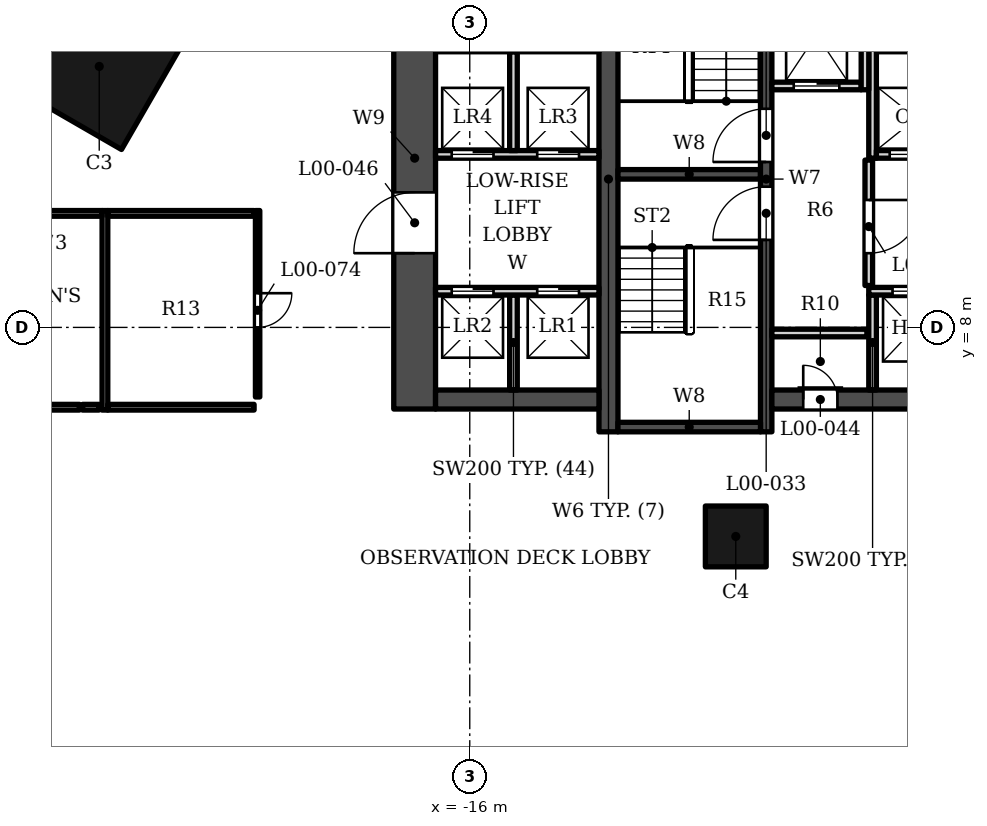
"""IFC4 building model, lengths in metres.
Left out: names, types, materials, properties, quantities, classifications, styles, units other than length and angle.
Written with IfcOpenShell. Run it as: python <this file> out.ifc"""

import sys

from ifc_helpers import new_model, si_unit, direction, frame, frame_2d, origin, origin_2d, place, context, subcontext, project, spatial, rectangle, extrude, element, fill, save


model = new_model("IFC4")
c1 = context("Model", 3, precision=1e-05, world=origin(), true_north=direction((0.0, 1.0)))
c2 = subcontext(c1, "Body", "Model", "MODEL_VIEW")
j1 = project(units=[si_unit("LENGTHUNIT", "METRE"), si_unit("PLANEANGLEUNIT", "RADIAN")], contexts=[c1])
p1 = place(None, origin())
s1 = spatial("IfcSite", under=j1, at=p1, CompositionType="ELEMENT")
p2 = place(p1, origin())
s2 = spatial("IfcBuilding", under=s1, at=p2, CompositionType="ELEMENT")
p3 = place(p2, origin())
s3 = spatial("IfcBuildingStorey", under=s2, at=p3, CompositionType="ELEMENT", Elevation=0.0)
p4 = place(p3, frame((-25.75, 14.867, 0.0), z_axis=(0.0, 0.0, 1.0), x_axis=(0.866025386331, -0.50000003023, 0.0)))
e1 = element("IfcColumn", 1, at=p4, inside=s3, PredefinedType="COLUMN", context=c2, shape_type="SweptSolid", body=[
    extrude(rectangle(XDim=3.2, YDim=3.2, at=origin_2d()), origin(), (0.0, 0.0, 1.0), 9.0),
])
p5 = place(p3, frame((-9.0, 2.5, 0.0), z_axis=(0.0, 0.0, 1.0), x_axis=(1.0, 0.0, 0.0)))
e2 = element("IfcColumn", 2, at=p5, inside=s3, PredefinedType="COLUMN", context=c2, shape_type="SweptSolid", body=[
    extrude(rectangle(XDim=1.6, YDim=1.6, at=origin_2d()), origin(), (0.0, 0.0, 1.0), 9.0),
])
p6 = place(p3, frame((-12.35, 5.253, 0.0), z_axis=(0.0, 0.0, 1.0), x_axis=(0.0, 1.0, 0.0)))
e3 = element("IfcWall", 3, at=p6, inside=s3, PredefinedType="SHEAR", context=c2, shape_type="SweptSolid", body=[
    extrude(rectangle(XDim=13.3, YDim=0.5, at=frame_2d((6.65, 0.0))), origin(), (0.0, 0.0, 1.0), 9.0),
])
p7 = place(p3, frame((-8.2, 5.253, 0.0), z_axis=(0.0, 0.0, 1.0), x_axis=(0.0, 1.0, 0.0)))
e4 = element("IfcWall", 4, at=p7, inside=s3, PredefinedType="SHEAR", context=c2, shape_type="SweptSolid", body=[
    extrude(rectangle(XDim=13.3, YDim=0.3, at=frame_2d((6.65, 0.0))), origin(), (0.0, 0.0, 1.0), 9.0),
])
p8 = place(p7, frame((7.1, 0.0, 0.0)))
e5 = element("IfcOpeningElement", 5, at=p8, cuts=e4, PredefinedType="OPENING", context=c2, shape_type="SweptSolid", body=[
    extrude(rectangle(XDim=1.4, YDim=2.1, at=frame_2d((0.7, 1.05))), frame((0.0, 0.16, 0.0), z_axis=(0.0, -1.0, 0.0), x_axis=(1.0, 0.0, 0.0)), (0.0, 0.0, 1.0), 0.32),
])
p9 = place(p7, frame((5.05, 0.0, 0.0)))
e6 = element("IfcOpeningElement", 6, at=p9, cuts=e4, PredefinedType="OPENING", context=c2, shape_type="SweptSolid", body=[
    extrude(rectangle(XDim=1.4, YDim=2.1, at=frame_2d((0.7, 1.05))), frame((0.0, 0.16, 0.0), z_axis=(0.0, -1.0, 0.0), x_axis=(1.0, 0.0, 0.0)), (0.0, 0.0, 1.0), 0.32),
])
for number, where, z_axis, x_axis in (
    (7, (-12.1, 12.028, 0.0), (0.0, 0.0, 1.0), (1.0, 0.0, 0.0)),
    (8, (-12.1, 5.378, 0.0), (0.0, 0.0, 1.0), (1.0, 0.0, 0.0)),
):
    element("IfcWall", number, at=place(p3, frame(where, z_axis=z_axis, x_axis=x_axis)), inside=s3, PredefinedType="SHEAR", context=c2, shape_type="SweptSolid", body=[
        extrude(rectangle(XDim=3.75, YDim=0.25, at=frame_2d((1.875, 0.0))), origin(), (0.0, 0.0, 1.0), 9.0),
    ])
p10 = place(p3, frame((-8.05, 6.103, 0.0), z_axis=(0.0, 0.0, 1.0), x_axis=(1.0, 0.0, 0.0)))
e9 = element("IfcWall", 9, at=p10, inside=s3, PredefinedType="SHEAR", context=c2, shape_type="SweptSolid", body=[
    extrude(rectangle(XDim=7.05, YDim=0.5, at=frame_2d((3.525, 0.0))), origin(), (0.0, 0.0, 1.0), 9.0),
])
p11 = place(p10, frame((0.825, 0.0, 0.0)))
e10 = element("IfcOpeningElement", 10, at=p11, cuts=e9, PredefinedType="OPENING", context=c2, shape_type="SweptSolid", body=[
    extrude(rectangle(XDim=0.9, YDim=2.1, at=frame_2d((0.45, 1.05))), frame((0.0, 0.26, 0.0), z_axis=(0.0, -1.0, 0.0), x_axis=(1.0, 0.0, 0.0)), (0.0, 0.0, 1.0), 0.52),
])
p12 = place(p3, frame((-12.6, 6.103, 0.0), z_axis=(0.0, 0.0, 1.0), x_axis=(-1.0, 0.0, 0.0)))
e11 = element("IfcWall", 11, at=p12, inside=s3, PredefinedType="SHEAR", context=c2, shape_type="SweptSolid", body=[
    extrude(rectangle(XDim=4.3, YDim=0.5, at=frame_2d((2.15, 0.0))), origin(), (0.0, 0.0, 1.0), 9.0),
])
p13 = place(p3, frame((-17.45, 5.853, 0.0), z_axis=(0.0, 0.0, 1.0), x_axis=(0.0, 1.0, 0.0)))
e12 = element("IfcWall", 12, at=p13, inside=s3, PredefinedType="SHEAR", context=c2, shape_type="SweptSolid", body=[
    extrude(rectangle(XDim=13.2, YDim=1.1, at=frame_2d((6.6, 0.0))), origin(), (0.0, 0.0, 1.0), 9.0),
])
p14 = place(p13, frame((4.1, 0.0, 0.0)))
e13 = element("IfcOpeningElement", 13, at=p14, cuts=e12, PredefinedType="OPENING", context=c2, shape_type="SweptSolid", body=[
    extrude(rectangle(XDim=1.6, YDim=2.1, at=frame_2d((0.8, 1.05))), frame((0.0, 0.56, 0.0), z_axis=(0.0, -1.0, 0.0), x_axis=(1.0, 0.0, 0.0)), (0.0, 0.0, 1.0), 1.12),
])
p15 = place(p13, frame((9.75, 0.0, 0.0)))
e14 = element("IfcOpeningElement", 14, at=p15, cuts=e12, PredefinedType="OPENING", context=c2, shape_type="SweptSolid", body=[
    extrude(rectangle(XDim=0.9, YDim=2.1, at=frame_2d((0.45, 1.05))), frame((0.0, 0.56, 0.0), z_axis=(0.0, -1.0, 0.0), x_axis=(1.0, 0.0, 0.0)), (0.0, 0.0, 1.0), 1.12),
])
for number, where, z_axis, x_axis in (
    (15, (-14.85, 6.353, 0.0), (0.0, 0.0, 1.0), (0.0, 1.0, 0.0)),
    (16, (-5.4, 6.353, 0.0), (0.0, 0.0, 1.0), (0.0, 1.0, 0.0)),
    (17, (-8.05, 7.853, 0.0), (0.0, 0.0, 1.0), (1.0, 0.0, 0.0)),
):
    element("IfcWall", number, at=place(p3, frame(where, z_axis=z_axis, x_axis=x_axis)), inside=s3, PredefinedType="SOLIDWALL", context=c2, shape_type="SweptSolid", body=[
        extrude(rectangle(XDim=2.5, YDim=0.2, at=frame_2d((1.25, 0.0))), origin(), (0.0, 0.0, 1.0), 8.5),
    ])
p16 = place(p3, frame((-16.9, 8.953, 0.0), z_axis=(0.0, 0.0, 1.0), x_axis=(1.0, 0.0, 0.0)))
e18 = element("IfcWall", 18, at=p16, inside=s3, PredefinedType="SOLIDWALL", context=c2, shape_type="SweptSolid", body=[
    extrude(rectangle(XDim=4.3, YDim=0.2, at=frame_2d((2.15, 0.0))), origin(), (0.0, 0.0, 1.0), 8.5),
])
p17 = place(p16, frame((2.675, 0.0, 0.0)))
e19 = element("IfcOpeningElement", 19, at=p17, cuts=e18, PredefinedType="OPENING", context=c2, shape_type="SweptSolid", body=[
    extrude(rectangle(XDim=1.1, YDim=2.1, at=frame_2d((0.55, 1.05))), frame((0.0, 0.11, 0.0), z_axis=(0.0, -1.0, 0.0), x_axis=(1.0, 0.0, 0.0)), (0.0, 0.0, 1.0), 0.22),
])
p18 = place(p16, frame((0.425, 0.0, 0.0)))
e20 = element("IfcOpeningElement", 20, at=p18, cuts=e18, PredefinedType="OPENING", context=c2, shape_type="SweptSolid", body=[
    extrude(rectangle(XDim=1.1, YDim=2.1, at=frame_2d((0.55, 1.05))), frame((0.0, 0.11, 0.0), z_axis=(0.0, -1.0, 0.0), x_axis=(1.0, 0.0, 0.0)), (0.0, 0.0, 1.0), 0.22),
])
p19 = place(p3, frame((-5.5, 8.953, 0.0), z_axis=(0.0, 0.0, 1.0), x_axis=(1.0, 0.0, 0.0)))
e21 = element("IfcWall", 21, at=p19, inside=s3, PredefinedType="SOLIDWALL", context=c2, shape_type="SweptSolid", body=[
    extrude(rectangle(XDim=4.5, YDim=0.2, at=frame_2d((2.25, 0.0))), origin(), (0.0, 0.0, 1.0), 8.5),
])
p20 = place(p19, frame((0.625, 0.0, 0.0)))
e22 = element("IfcOpeningElement", 22, at=p20, cuts=e21, PredefinedType="OPENING", context=c2, shape_type="SweptSolid", body=[
    extrude(rectangle(XDim=1.1, YDim=2.1, at=frame_2d((0.55, 1.05))), frame((0.0, 0.11, 0.0), z_axis=(0.0, -1.0, 0.0), x_axis=(1.0, 0.0, 0.0)), (0.0, 0.0, 1.0), 0.22),
])
p21 = place(p19, frame((2.775, 0.0, 0.0)))
e23 = element("IfcOpeningElement", 23, at=p21, cuts=e21, PredefinedType="OPENING", context=c2, shape_type="SweptSolid", body=[
    extrude(rectangle(XDim=1.1, YDim=2.1, at=frame_2d((0.55, 1.05))), frame((0.0, 0.11, 0.0), z_axis=(0.0, -1.0, 0.0), x_axis=(1.0, 0.0, 0.0)), (0.0, 0.0, 1.0), 0.22),
])
p22 = place(p3, frame((-5.5, 9.103, 0.0), z_axis=(0.0, 0.0, 1.0), x_axis=(0.0, 1.0, 0.0)))
e24 = element("IfcWall", 24, at=p22, inside=s3, PredefinedType="SOLIDWALL", context=c2, shape_type="SweptSolid", body=[
    extrude(rectangle(XDim=3.3, YDim=0.2, at=frame_2d((1.65, 0.0))), origin(), (0.0, 0.0, 1.0), 8.5),
])
p23 = place(p22, frame((0.85, 0.0, 0.0)))
e25 = element("IfcOpeningElement", 25, at=p23, cuts=e24, PredefinedType="OPENING", context=c2, shape_type="SweptSolid", body=[
    extrude(rectangle(XDim=1.4, YDim=2.1, at=frame_2d((0.7, 1.05))), frame((0.0, 0.11, 0.0), z_axis=(0.0, -1.0, 0.0), x_axis=(1.0, 0.0, 0.0)), (0.0, 0.0, 1.0), 0.22),
])
p24 = place(p3, frame((-16.9, 12.552, 0.0), z_axis=(0.0, 0.0, 1.0), x_axis=(1.0, 0.0, 0.0)))
e26 = element("IfcWall", 26, at=p24, inside=s3, PredefinedType="SOLIDWALL", context=c2, shape_type="SweptSolid", body=[
    extrude(rectangle(XDim=4.3, YDim=0.2, at=frame_2d((2.15, 0.0))), origin(), (0.0, 0.0, 1.0), 8.5),
])
p25 = place(p24, frame((2.675, 0.0, 0.0)))
e27 = element("IfcOpeningElement", 27, at=p25, cuts=e26, PredefinedType="OPENING", context=c2, shape_type="SweptSolid", body=[
    extrude(rectangle(XDim=1.1, YDim=2.1, at=frame_2d((0.55, 1.05))), frame((0.0, 0.11, 0.0), z_axis=(0.0, -1.0, 0.0), x_axis=(1.0, 0.0, 0.0)), (0.0, 0.0, 1.0), 0.22),
])
p26 = place(p24, frame((0.425, 0.0, 0.0)))
e28 = element("IfcOpeningElement", 28, at=p26, cuts=e26, PredefinedType="OPENING", context=c2, shape_type="SweptSolid", body=[
    extrude(rectangle(XDim=1.1, YDim=2.1, at=frame_2d((0.55, 1.05))), frame((0.0, 0.11, 0.0), z_axis=(0.0, -1.0, 0.0), x_axis=(1.0, 0.0, 0.0)), (0.0, 0.0, 1.0), 0.22),
])
p27 = place(p3, frame((-5.4, 12.453, 0.0), z_axis=(0.0, 0.0, 1.0), x_axis=(0.0, 1.0, 0.0)))
e29 = element("IfcWall", 29, at=p27, inside=s3, PredefinedType="SOLIDWALL", context=c2, shape_type="SweptSolid", body=[
    extrude(rectangle(XDim=3.0, YDim=0.2, at=frame_2d((1.5, 0.0))), origin(), (0.0, 0.0, 1.0), 8.5),
])
p28 = place(p3, frame((-5.3, 12.552, 0.0), z_axis=(0.0, 0.0, 1.0), x_axis=(1.0, 0.0, 0.0)))
e30 = element("IfcWall", 30, at=p28, inside=s3, PredefinedType="SOLIDWALL", context=c2, shape_type="SweptSolid", body=[
    extrude(rectangle(XDim=2.1, YDim=0.2, at=frame_2d((1.05, 0.0))), origin(), (0.0, 0.0, 1.0), 8.5),
])
p29 = place(p28, frame((0.35, 0.0, 0.0)))
e31 = element("IfcOpeningElement", 31, at=p29, cuts=e30, PredefinedType="OPENING", context=c2, shape_type="SweptSolid", body=[
    extrude(rectangle(XDim=1.4, YDim=2.4, at=frame_2d((0.7, 1.2))), frame((0.0, 0.11, 0.0), z_axis=(0.0, -1.0, 0.0), x_axis=(1.0, 0.0, 0.0)), (0.0, 0.0, 1.0), 0.22),
])
p30 = place(p3, frame((-14.85, 12.653, 0.0), z_axis=(0.0, 0.0, 1.0), x_axis=(0.0, 1.0, 0.0)))
e32 = element("IfcWall", 32, at=p30, inside=s3, PredefinedType="SOLIDWALL", context=c2, shape_type="SweptSolid", body=[
    extrude(rectangle(XDim=2.6, YDim=0.2, at=frame_2d((1.3, 0.0))), origin(), (0.0, 0.0, 1.0), 8.5),
])
p31 = place(p3, frame((-8.05, 14.353, 0.0), z_axis=(0.0, 0.0, 1.0), x_axis=(1.0, 0.0, 0.0)))
e33 = element("IfcWall", 33, at=p31, inside=s3, PredefinedType="SOLIDWALL", context=c2, shape_type="SweptSolid", body=[
    extrude(rectangle(XDim=2.35, YDim=0.2, at=frame_2d((1.175, 0.0))), origin(), (0.0, 0.0, 1.0), 8.5),
])
p32 = place(p31, frame((0.575, 0.0, 0.0)))
e34 = element("IfcOpeningElement", 34, at=p32, cuts=e33, PredefinedType="OPENING", context=c2, shape_type="SweptSolid", body=[
    extrude(rectangle(XDim=1.2, YDim=2.1, at=frame_2d((0.6, 1.05))), frame((0.0, 0.11, 0.0), z_axis=(0.0, -1.0, 0.0), x_axis=(1.0, 0.0, 0.0)), (0.0, 0.0, 1.0), 0.22),
])
for number, where, z_axis, x_axis in (
    (35, (-5.6, 14.253, 0.0), (0.0, 0.0, 1.0), (0.0, 1.0, 0.0)),
    (36, (-16.9, 15.353, 0.0), (0.0, 0.0, 1.0), (1.0, 0.0, 0.0)),
):
    element("IfcWall", number, at=place(p3, frame(where, z_axis=z_axis, x_axis=x_axis)), inside=s3, PredefinedType="SOLIDWALL", context=c2, shape_type="SweptSolid", body=[
        extrude(rectangle(XDim=4.3, YDim=0.2, at=frame_2d((2.15, 0.0))), origin(), (0.0, 0.0, 1.0), 8.5),
    ])
p33 = place(p3, frame((-5.3, 15.353, 0.0), z_axis=(0.0, 0.0, 1.0), x_axis=(1.0, 0.0, 0.0)))
e37 = element("IfcWall", 37, at=p33, inside=s3, PredefinedType="SOLIDWALL", context=c2, shape_type="SweptSolid", body=[
    extrude(rectangle(XDim=2.1, YDim=0.2, at=frame_2d((1.05, 0.0))), origin(), (0.0, 0.0, 1.0), 8.5),
])
p34 = place(p3, frame((-29.525, 5.9, 0.0), z_axis=(0.0, 0.0, 1.0), x_axis=(1.0, 0.0, 0.0)))
e38 = element("IfcWall", 38, at=p34, inside=s3, PredefinedType="PARTITIONING", context=c2, shape_type="SweptSolid", body=[
    extrude(rectangle(XDim=3.255, YDim=0.15, at=frame_2d((1.627, 0.0))), origin(), (0.0, 0.0, 1.0), 8.5),
])
p35 = place(p3, frame((-25.6, 5.825, 0.0), z_axis=(0.0, 0.0, 1.0), x_axis=(0.0, 1.0, 0.0)))
e39 = element("IfcWall", 39, at=p35, inside=s3, PredefinedType="PARTITIONING", context=c2, shape_type="SweptSolid", body=[
    extrude(rectangle(XDim=5.25, YDim=0.15, at=frame_2d((2.625, 0.0))), origin(), (0.0, 0.0, 1.0), 7.3),
])
p36 = place(p3, frame((-25.525, 5.9, 0.0), z_axis=(0.0, 0.0, 1.0), x_axis=(1.0, 0.0, 0.0)))
e40 = element("IfcWall", 40, at=p36, inside=s3, PredefinedType="PARTITIONING", context=c2, shape_type="SweptSolid", body=[
    extrude(rectangle(XDim=3.85, YDim=0.15, at=frame_2d((1.925, 0.0))), origin(), (0.0, 0.0, 1.0), 7.6),
])
p37 = place(p3, frame((-21.583, 6.17, 0.0), z_axis=(0.0, 0.0, 1.0), x_axis=(0.0, 1.0, 0.0)))
e41 = element("IfcWall", 41, at=p37, inside=s3, PredefinedType="PARTITIONING", context=c2, shape_type="SweptSolid", body=[
    extrude(rectangle(XDim=4.905, YDim=0.115, at=frame_2d((2.453, 0.0))), origin(), (0.0, 0.0, 1.0), 7.3),
])
p38 = place(p37, frame((1.83, 0.0, 0.0)))
e42 = element("IfcOpeningElement", 42, at=p38, cuts=e41, PredefinedType="OPENING", context=c2, shape_type="SweptSolid", body=[
    extrude(rectangle(XDim=0.9, YDim=2.1, at=frame_2d((0.45, 1.05))), frame((0.0, 0.067, 0.0), z_axis=(0.0, -1.0, 0.0), x_axis=(1.0, 0.0, 0.0)), (0.0, 0.0, 1.0), 0.135),
])
p39 = place(p3, frame((-29.525, 11.0, 0.0), z_axis=(0.0, 0.0, 1.0), x_axis=(1.0, 0.0, 0.0)))
e43 = element("IfcWall", 43, at=p39, inside=s3, PredefinedType="PARTITIONING", context=c2, shape_type="SweptSolid", body=[
    extrude(rectangle(XDim=3.85, YDim=0.15, at=frame_2d((1.925, 0.0))), origin(), (0.0, 0.0, 1.0), 8.5),
])
p40 = place(p39, frame((1.425, 0.0, 0.0)))
e44 = element("IfcOpeningElement", 44, at=p40, cuts=e43, PredefinedType="OPENING", context=c2, shape_type="SweptSolid", body=[
    extrude(rectangle(XDim=0.9, YDim=2.1, at=frame_2d((0.45, 1.05))), frame((0.0, 0.085, 0.0), z_axis=(0.0, -1.0, 0.0), x_axis=(1.0, 0.0, 0.0)), (0.0, 0.0, 1.0), 0.17),
])
p41 = place(p3, frame((-25.525, 11.0, 0.0), z_axis=(0.0, 0.0, 1.0), x_axis=(1.0, 0.0, 0.0)))
e45 = element("IfcWall", 45, at=p41, inside=s3, PredefinedType="PARTITIONING", context=c2, shape_type="SweptSolid", body=[
    extrude(rectangle(XDim=3.85, YDim=0.15, at=frame_2d((1.925, 0.0))), origin(), (0.0, 0.0, 1.0), 7.6),
])
p42 = place(p3, frame((-26.19, 5.9, 0.0), z_axis=(0.0, 0.0, 1.0), x_axis=(1.0, 0.0, 0.0)))
e46 = element("IfcWall", 46, at=p42, inside=s3, PredefinedType="PARTITIONING", context=c2, shape_type="SweptSolid", body=[
    extrude(rectangle(XDim=0.435, YDim=0.15, at=frame_2d((0.218, 0.0))), origin(), (0.0, 0.0, 1.0), 8.5),
])
p43 = place(p20, origin())
e47 = element("IfcDoor", 47, at=p43, inside=s3, OperationType="DOUBLE_DOOR_SLIDING", PredefinedType="DOOR", context=c2, shape_type="SweptSolid", body=[
    extrude(rectangle(XDim=1.1, YDim=2.1, at=frame_2d((0.55, 1.05))), frame((0.0, 0.025, 0.0), z_axis=(0.0, -1.0, 0.0), x_axis=(1.0, 0.0, 0.0)), (0.0, 0.0, 1.0), 0.05),
])
fill(e22, e47)
p44 = place(p29, origin())
e48 = element("IfcDoor", 48, at=p44, inside=s3, OperationType="DOUBLE_DOOR_SLIDING", PredefinedType="DOOR", context=c2, shape_type="SweptSolid", body=[
    extrude(rectangle(XDim=1.4, YDim=2.4, at=frame_2d((0.7, 1.2))), frame((0.0, 0.025, 0.0), z_axis=(0.0, -1.0, 0.0), x_axis=(1.0, 0.0, 0.0)), (0.0, 0.0, 1.0), 0.05),
])
fill(e31, e48)
p45 = place(p32, origin())
e49 = element("IfcDoor", 49, at=p45, inside=s3, OperationType="DOUBLE_DOOR_SLIDING", PredefinedType="DOOR", context=c2, shape_type="SweptSolid", body=[
    extrude(rectangle(XDim=1.2, YDim=2.1, at=frame_2d((0.6, 1.05))), frame((0.0, 0.025, 0.0), z_axis=(0.0, -1.0, 0.0), x_axis=(1.0, 0.0, 0.0)), (0.0, 0.0, 1.0), 0.05),
])
fill(e34, e49)
p46 = place(p17, origin())
e50 = element("IfcDoor", 50, at=p46, inside=s3, OperationType="DOUBLE_DOOR_SLIDING", PredefinedType="DOOR", context=c2, shape_type="SweptSolid", body=[
    extrude(rectangle(XDim=1.1, YDim=2.1, at=frame_2d((0.55, 1.05))), frame((0.0, 0.025, 0.0), z_axis=(0.0, -1.0, 0.0), x_axis=(1.0, 0.0, 0.0)), (0.0, 0.0, 1.0), 0.05),
])
fill(e19, e50)
p47 = place(p25, origin())
e51 = element("IfcDoor", 51, at=p47, inside=s3, OperationType="DOUBLE_DOOR_SLIDING", PredefinedType="DOOR", context=c2, shape_type="SweptSolid", body=[
    extrude(rectangle(XDim=1.1, YDim=2.1, at=frame_2d((0.55, 1.05))), frame((0.0, 0.025, 0.0), z_axis=(0.0, -1.0, 0.0), x_axis=(1.0, 0.0, 0.0)), (0.0, 0.0, 1.0), 0.05),
])
fill(e27, e51)
p48 = place(p18, origin())
e52 = element("IfcDoor", 52, at=p48, inside=s3, OperationType="DOUBLE_DOOR_SLIDING", PredefinedType="DOOR", context=c2, shape_type="SweptSolid", body=[
    extrude(rectangle(XDim=1.1, YDim=2.1, at=frame_2d((0.55, 1.05))), frame((0.0, 0.025, 0.0), z_axis=(0.0, -1.0, 0.0), x_axis=(1.0, 0.0, 0.0)), (0.0, 0.0, 1.0), 0.05),
])
fill(e20, e52)
p49 = place(p26, origin())
e53 = element("IfcDoor", 53, at=p49, inside=s3, OperationType="DOUBLE_DOOR_SLIDING", PredefinedType="DOOR", context=c2, shape_type="SweptSolid", body=[
    extrude(rectangle(XDim=1.1, YDim=2.1, at=frame_2d((0.55, 1.05))), frame((0.0, 0.025, 0.0), z_axis=(0.0, -1.0, 0.0), x_axis=(1.0, 0.0, 0.0)), (0.0, 0.0, 1.0), 0.05),
])
fill(e28, e53)
p50 = place(p8, origin())
e54 = element("IfcDoor", 54, at=p50, inside=s3, OperationType="SINGLE_SWING_LEFT", PredefinedType="DOOR", context=c2, shape_type="SweptSolid", body=[
    extrude(rectangle(XDim=1.4, YDim=2.1, at=frame_2d((0.7, 1.05))), frame((0.0, 0.025, 0.0), z_axis=(0.0, -1.0, 0.0), x_axis=(1.0, 0.0, 0.0)), (0.0, 0.0, 1.0), 0.05),
])
fill(e5, e54)
p51 = place(p9, origin())
e55 = element("IfcDoor", 55, at=p51, inside=s3, OperationType="SINGLE_SWING_LEFT", PredefinedType="DOOR", context=c2, shape_type="SweptSolid", body=[
    extrude(rectangle(XDim=1.4, YDim=2.1, at=frame_2d((0.7, 1.05))), frame((0.0, 0.025, 0.0), z_axis=(0.0, -1.0, 0.0), x_axis=(1.0, 0.0, 0.0)), (0.0, 0.0, 1.0), 0.05),
])
fill(e6, e55)
p52 = place(p23, origin())
e56 = element("IfcDoor", 56, at=p52, inside=s3, OperationType="SINGLE_SWING_RIGHT", PredefinedType="DOOR", context=c2, shape_type="SweptSolid", body=[
    extrude(rectangle(XDim=1.4, YDim=2.1, at=frame_2d((0.7, 1.05))), frame((0.0, 0.025, 0.0), z_axis=(0.0, -1.0, 0.0), x_axis=(1.0, 0.0, 0.0)), (0.0, 0.0, 1.0), 0.05),
])
fill(e25, e56)
p53 = place(p11, origin())
e57 = element("IfcDoor", 57, at=p53, inside=s3, OperationType="SINGLE_SWING_LEFT", PredefinedType="DOOR", context=c2, shape_type="SweptSolid", body=[
    extrude(rectangle(XDim=0.9, YDim=2.1, at=frame_2d((0.45, 1.05))), frame((0.0, 0.025, 0.0), z_axis=(0.0, -1.0, 0.0), x_axis=(1.0, 0.0, 0.0)), (0.0, 0.0, 1.0), 0.05),
])
fill(e10, e57)
p54 = place(p14, origin())
e58 = element("IfcDoor", 58, at=p54, inside=s3, OperationType="DOUBLE_DOOR_SINGLE_SWING", PredefinedType="DOOR", context=c2, shape_type="SweptSolid", body=[
    extrude(rectangle(XDim=1.6, YDim=2.1, at=frame_2d((0.8, 1.05))), frame((0.0, -0.225, 0.0), z_axis=(0.0, -1.0, 0.0), x_axis=(1.0, 0.0, 0.0)), (0.0, 0.0, 1.0), 0.05),
])
fill(e13, e58)
p55 = place(p38, origin())
e59 = element("IfcDoor", 59, at=p55, inside=s3, OperationType="SINGLE_SWING_RIGHT", PredefinedType="DOOR", context=c2, shape_type="SweptSolid", body=[
    extrude(rectangle(XDim=0.9, YDim=2.1, at=frame_2d((0.45, 1.05))), frame((0.0, 0.025, 0.0), z_axis=(0.0, -1.0, 0.0), x_axis=(1.0, 0.0, 0.0)), (0.0, 0.0, 1.0), 0.05),
])
fill(e42, e59)
save(model, sys.argv[1])
